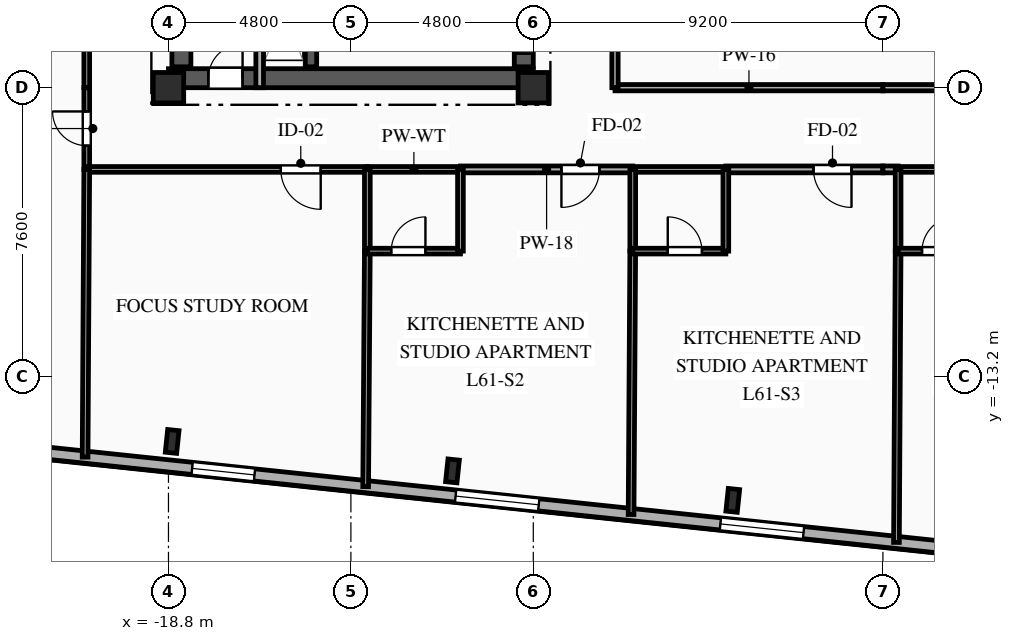
"""IFC4 building model, lengths in metres.
Left out: names, types, materials, properties, quantities, classifications, styles, units other than length and angle.
Written with IfcOpenShell. Run it as: python <this file> out.ifc"""

import sys

from ifc_helpers import new_model, si_unit, direction, frame, frame_2d, origin, origin_2d, place, context, subcontext, project, spatial, rectangle, i_section, extrude, element, fill, save


model = new_model("IFC4")
c1 = context("Model", 3, precision=1e-05, world=origin(), true_north=direction((0.0, 1.0)))
c2 = subcontext(c1, "Body", "Model", "MODEL_VIEW")
j1 = project(units=[si_unit("LENGTHUNIT", "METRE"), si_unit("PLANEANGLEUNIT", "RADIAN")], contexts=[c1])
p1 = place(None, origin())
s1 = spatial("IfcSite", under=j1, at=p1, CompositionType="ELEMENT")
p2 = place(p1, origin())
s2 = spatial("IfcBuilding", under=s1, at=p2, CompositionType="ELEMENT")
p3 = place(p2, frame((0.0, 0.0, 216.5)))
s3 = spatial("IfcBuildingStorey", under=s2, at=p3, CompositionType="ELEMENT", Elevation=216.5)
for number, where, z_axis, x_axis in (
    (1, (-18.8, -5.6, 0.0), (0.0, 0.0, 1.0), (1.0, 0.0, 0.0)),
    (2, (-9.2, -5.6, 0.0), (0.0, 0.0, 1.0), (1.0, 0.0, 0.0)),
):
    element("IfcColumn", number, at=place(p3, frame(where, z_axis=z_axis, x_axis=x_axis)), inside=s3, PredefinedType="COLUMN", context=c2, shape_type="SweptSolid", body=[
        extrude(rectangle(XDim=0.8, YDim=0.8, at=origin_2d()), origin(), (0.0, 0.0, 1.0), 3.35),
    ])
for number, where, z_axis, x_axis in (
    (3, (-18.703, -14.908, 0.0), (0.0, 0.0, 1.0), (0.995, -0.105, 0.0)),
    (4, (-11.327, -15.683, 0.0), (0.0, 0.0, 1.0), (0.995, -0.105, 0.0)),
    (5, (-3.951, -16.458, 0.0), (0.0, 0.0, 1.0), (0.995, -0.105, 0.0)),
):
    element("IfcColumn", number, at=place(p3, frame(where, z_axis=z_axis, x_axis=x_axis)), inside=s3, PredefinedType="COLUMN", context=c2, shape_type="SweptSolid", body=[
        extrude(i_section(OverallWidth=0.3, OverallDepth=0.6, WebThickness=0.015, FlangeThickness=0.03, FilletRadius=0.027, at=origin_2d()), origin(), (0.0, 0.0, 1.0), 3.35),
    ])
p4 = place(p3, frame((18.756, -19.498, 0.0), z_axis=(0.0, 0.0, 1.0), x_axis=(-0.994522060044, 0.104526896475, 0.0)))
e6 = element("IfcWall", 6, at=p4, inside=s3, PredefinedType="SOLIDWALL", context=c2, shape_type="SweptSolid", body=[
    extrude(rectangle(XDim=45.8, YDim=0.32, at=frame_2d((22.9, 0.0))), origin(), (0.0, 0.0, 1.0), 3.04),
])
p5 = place(p4, frame((1.657, 0.0, 0.85)))
e7 = element("IfcOpeningElement", 7, at=p5, cuts=e6, PredefinedType="OPENING", context=c2, shape_type="SweptSolid", body=[
    extrude(rectangle(XDim=1.65, YDim=1.85, at=frame_2d((0.825, 0.925))), frame((0.0, 0.17, 0.0), z_axis=(0.0, -1.0, 0.0), x_axis=(1.0, 0.0, 0.0)), (0.0, 0.0, 1.0), 0.34),
])
p6 = place(p4, frame((6.907, 0.0, 0.85)))
e8 = element("IfcOpeningElement", 8, at=p6, cuts=e6, PredefinedType="OPENING", context=c2, shape_type="SweptSolid", body=[
    extrude(rectangle(XDim=2.2, YDim=1.85, at=frame_2d((1.1, 0.925))), frame((0.0, 0.17, 0.0), z_axis=(0.0, -1.0, 0.0), x_axis=(1.0, 0.0, 0.0)), (0.0, 0.0, 1.0), 0.34),
])
p7 = place(p4, frame((13.953, 0.0, 0.85)))
e9 = element("IfcOpeningElement", 9, at=p7, cuts=e6, PredefinedType="OPENING", context=c2, shape_type="SweptSolid", body=[
    extrude(rectangle(XDim=2.2, YDim=1.85, at=frame_2d((1.1, 0.925))), frame((0.0, 0.17, 0.0), z_axis=(0.0, -1.0, 0.0), x_axis=(1.0, 0.0, 0.0)), (0.0, 0.0, 1.0), 0.34),
])
p8 = place(p4, frame((20.959, 0.0, 0.85)))
e10 = element("IfcOpeningElement", 10, at=p8, cuts=e6, PredefinedType="OPENING", context=c2, shape_type="SweptSolid", body=[
    extrude(rectangle(XDim=2.2, YDim=1.85, at=frame_2d((1.1, 0.925))), frame((0.0, 0.17, 0.0), z_axis=(0.0, -1.0, 0.0), x_axis=(1.0, 0.0, 0.0)), (0.0, 0.0, 1.0), 0.34),
])
p9 = place(p4, frame((27.965, 0.0, 0.85)))
e11 = element("IfcOpeningElement", 11, at=p9, cuts=e6, PredefinedType="OPENING", context=c2, shape_type="SweptSolid", body=[
    extrude(rectangle(XDim=2.2, YDim=1.85, at=frame_2d((1.1, 0.925))), frame((0.0, 0.17, 0.0), z_axis=(0.0, -1.0, 0.0), x_axis=(1.0, 0.0, 0.0)), (0.0, 0.0, 1.0), 0.34),
])
p10 = place(p4, frame((35.487, 0.0, 0.85)))
e12 = element("IfcOpeningElement", 12, at=p10, cuts=e6, PredefinedType="OPENING", context=c2, shape_type="SweptSolid", body=[
    extrude(rectangle(XDim=1.65, YDim=1.85, at=frame_2d((0.825, 0.925))), frame((0.0, 0.17, 0.0), z_axis=(0.0, -1.0, 0.0), x_axis=(1.0, 0.0, 0.0)), (0.0, 0.0, 1.0), 0.34),
])
p11 = place(p4, frame((41.212, 0.0, 0.85)))
e13 = element("IfcOpeningElement", 13, at=p11, cuts=e6, PredefinedType="OPENING", context=c2, shape_type="SweptSolid", body=[
    extrude(rectangle(XDim=1.65, YDim=1.85, at=frame_2d((0.825, 0.925))), frame((0.0, 0.17, 0.0), z_axis=(0.0, -1.0, 0.0), x_axis=(1.0, 0.0, 0.0)), (0.0, 0.0, 1.0), 0.34),
])
p12 = place(p3, frame((-18.8, -5.35, 0.0), z_axis=(0.0, 0.0, 1.0), x_axis=(1.0, 0.0, 0.0)))
e14 = element("IfcWall", 14, at=p12, inside=s3, PredefinedType="SHEAR", context=c2, shape_type="SweptSolid", body=[
    extrude(rectangle(XDim=9.6, YDim=0.5, at=frame_2d((4.8, 0.0))), origin(), (0.0, 0.0, 1.0), 3.04),
])
p13 = place(p12, frame((1.05, 0.0, 0.0)))
e15 = element("IfcOpeningElement", 15, at=p13, cuts=e14, PredefinedType="OPENING", context=c2, shape_type="SweptSolid", body=[
    extrude(rectangle(XDim=0.9, YDim=2.1, at=frame_2d((0.45, 1.05))), frame((0.0, 0.26, 0.0), z_axis=(0.0, -1.0, 0.0), x_axis=(1.0, 0.0, 0.0)), (0.0, 0.0, 1.0), 0.52),
])
p14 = place(p3, frame((-18.46, -5.05, 0.0), z_axis=(0.0, 0.0, 1.0), x_axis=(0.0, 1.0, 0.0)))
e16 = element("IfcWall", 16, at=p14, inside=s3, PredefinedType="SHEAR", context=c2, shape_type="SweptSolid", body=[
    extrude(rectangle(XDim=10.1, YDim=0.5, at=frame_2d((5.05, 0.0))), origin(), (0.0, 0.0, 1.0), 3.04),
])
p15 = place(p3, frame((-9.45, -5.05, 0.0), z_axis=(0.0, 0.0, 1.0), x_axis=(0.0, 1.0, 0.0)))
e17 = element("IfcWall", 17, at=p15, inside=s3, PredefinedType="SHEAR", context=c2, shape_type="SweptSolid", body=[
    extrude(rectangle(XDim=10.1, YDim=0.5, at=frame_2d((5.05, 0.0))), origin(), (0.0, 0.0, 1.0), 3.04),
])
p16 = place(p15, frame((7.15, 0.0, 0.0)))
e18 = element("IfcOpeningElement", 18, at=p16, cuts=e17, PredefinedType="OPENING", context=c2, shape_type="SweptSolid", body=[
    extrude(rectangle(XDim=0.9, YDim=2.1, at=frame_2d((0.45, 1.05))), frame((0.0, 0.26, 0.0), z_axis=(0.0, -1.0, 0.0), x_axis=(1.0, 0.0, 0.0)), (0.0, 0.0, 1.0), 0.52),
])
p17 = place(p15, frame((2.4, 0.0, 0.0)))
e19 = element("IfcOpeningElement", 19, at=p17, cuts=e17, PredefinedType="OPENING", context=c2, shape_type="SweptSolid", body=[
    extrude(rectangle(XDim=1.2, YDim=2.15, at=frame_2d((0.6, 1.075))), frame((0.0, 0.26, 0.0), z_axis=(0.0, -1.0, 0.0), x_axis=(1.0, 0.0, 0.0)), (0.0, 0.0, 1.0), 0.52),
])
p18 = place(p15, frame((0.35, 0.0, 0.0)))
e20 = element("IfcOpeningElement", 20, at=p18, cuts=e17, PredefinedType="OPENING", context=c2, shape_type="SweptSolid", body=[
    extrude(rectangle(XDim=0.9, YDim=2.1, at=frame_2d((0.45, 1.05))), frame((0.0, 0.26, 0.0), z_axis=(0.0, -1.0, 0.0), x_axis=(1.0, 0.0, 0.0)), (0.0, 0.0, 1.0), 0.52),
])
p19 = place(p15, frame((5.0, 0.0, 0.0)))
e21 = element("IfcOpeningElement", 21, at=p19, cuts=e17, PredefinedType="OPENING", context=c2, shape_type="SweptSolid", body=[
    extrude(rectangle(XDim=0.9, YDim=2.1, at=frame_2d((0.45, 1.05))), frame((0.0, 0.26, 0.0), z_axis=(0.0, -1.0, 0.0), x_axis=(1.0, 0.0, 0.0)), (0.0, 0.0, 1.0), 0.52),
])
p20 = place(p3, frame((-15.05, -5.05, 0.0), z_axis=(0.0, 0.0, 1.0), x_axis=(0.0, 1.0, 0.0)))
e22 = element("IfcWall", 22, at=p20, inside=s3, PredefinedType="SHEAR", context=c2, shape_type="SweptSolid", body=[
    extrude(rectangle(XDim=10.1, YDim=0.3, at=frame_2d((5.05, 0.0))), origin(), (0.0, 0.0, 1.0), 3.04),
])
p21 = place(p3, frame((-16.4, -5.6, 0.0), z_axis=(0.0, 0.0, 1.0), x_axis=(0.0, 1.0, 0.0)))
e23 = element("IfcWall", 23, at=p21, inside=s3, PredefinedType="PARTITIONING", context=c2, shape_type="SweptSolid", body=[
    extrude(rectangle(XDim=3.49, YDim=0.2, at=frame_2d((1.745, 0.0))), origin(), (0.0, 0.0, 1.0), 3.04),
])
p22 = place(p3, frame((-20.95, -7.75, 0.0), z_axis=(0.0, 0.0, 1.0), x_axis=(0.0, 1.0, 0.0)))
e24 = element("IfcWall", 24, at=p22, inside=s3, PredefinedType="PARTITIONING", context=c2, shape_type="SweptSolid", body=[
    extrude(rectangle(XDim=2.15, YDim=0.15, at=frame_2d((1.075, 0.0))), origin(), (0.0, 0.0, 1.0), 3.04),
])
p23 = place(p22, frame((0.625, 0.0, 0.0)))
e25 = element("IfcOpeningElement", 25, at=p23, cuts=e24, PredefinedType="OPENING", context=c2, shape_type="SweptSolid", body=[
    extrude(rectangle(XDim=0.9, YDim=2.1, at=frame_2d((0.45, 1.05))), frame((0.0, 0.085, 0.0), z_axis=(0.0, -1.0, 0.0), x_axis=(1.0, 0.0, 0.0)), (0.0, 0.0, 1.0), 0.17),
])
p24 = place(p3, frame((-13.567, -7.75, 0.0), z_axis=(0.0, 0.0, 1.0), x_axis=(-1.0, 0.0, 0.0)))
e26 = element("IfcWall", 26, at=p24, inside=s3, PredefinedType="PARTITIONING", context=c2, shape_type="SweptSolid", body=[
    extrude(rectangle(XDim=7.383, YDim=0.15, at=frame_2d((3.691, 0.0))), origin(), (0.0, 0.0, 1.0), 3.04),
])
p25 = place(p24, frame((1.227, 0.0, 0.0)))
e27 = element("IfcOpeningElement", 27, at=p25, cuts=e26, PredefinedType="OPENING", context=c2, shape_type="SweptSolid", body=[
    extrude(rectangle(XDim=1.05, YDim=2.15, at=frame_2d((0.525, 1.075))), frame((0.0, 0.085, 0.0), z_axis=(0.0, -1.0, 0.0), x_axis=(1.0, 0.0, 0.0)), (0.0, 0.0, 1.0), 0.17),
])
p26 = place(p3, frame((-6.583, -7.75, 0.0), z_axis=(0.0, 0.0, 1.0), x_axis=(-1.0, 0.0, 0.0)))
e28 = element("IfcWall", 28, at=p26, inside=s3, PredefinedType="PARTITIONING", context=c2, shape_type="SweptSolid", body=[
    extrude(rectangle(XDim=4.534, YDim=0.18, at=frame_2d((2.267, 0.0))), origin(), (0.0, 0.0, 1.0), 3.04),
])
p27 = place(p26, frame((0.877, 0.0, 0.0)))
e29 = element("IfcOpeningElement", 29, at=p27, cuts=e28, PredefinedType="OPENING", context=c2, shape_type="SweptSolid", body=[
    extrude(rectangle(XDim=1.0, YDim=2.15, at=frame_2d((0.5, 1.075))), frame((0.0, 0.1, 0.0), z_axis=(0.0, -1.0, 0.0), x_axis=(1.0, 0.0, 0.0)), (0.0, 0.0, 1.0), 0.2),
])
p28 = place(p3, frame((-11.117, -7.75, 0.0), z_axis=(0.0, 0.0, 1.0), x_axis=(-1.0, 0.0, 0.0)))
e30 = element("IfcWall", 30, at=p28, inside=s3, PredefinedType="PLUMBINGWALL", context=c2, shape_type="SweptSolid", body=[
    extrude(rectangle(XDim=2.45, YDim=0.15, at=frame_2d((1.225, 0.0))), origin(), (0.0, 0.0, 1.0), 3.04),
])
p29 = place(p3, frame((0.0, -7.75, 0.0), z_axis=(0.0, 0.0, 1.0), x_axis=(-1.0, 0.0, 0.0)))
e31 = element("IfcWall", 31, at=p29, inside=s3, PredefinedType="PARTITIONING", context=c2, shape_type="SweptSolid", body=[
    extrude(rectangle(XDim=4.133, YDim=0.18, at=frame_2d((2.066, 0.0))), origin(), (0.0, 0.0, 1.0), 3.04),
])
p30 = place(p29, frame((0.827, 0.0, 0.0)))
e32 = element("IfcOpeningElement", 32, at=p30, cuts=e31, PredefinedType="OPENING", context=c2, shape_type="SweptSolid", body=[
    extrude(rectangle(XDim=1.0, YDim=2.15, at=frame_2d((0.5, 1.075))), frame((0.0, 0.1, 0.0), z_axis=(0.0, -1.0, 0.0), x_axis=(1.0, 0.0, 0.0)), (0.0, 0.0, 1.0), 0.2),
])
p31 = place(p3, frame((-4.133, -7.75, 0.0), z_axis=(0.0, 0.0, 1.0), x_axis=(-1.0, 0.0, 0.0)))
e33 = element("IfcWall", 33, at=p31, inside=s3, PredefinedType="PLUMBINGWALL", context=c2, shape_type="SweptSolid", body=[
    extrude(rectangle(XDim=2.45, YDim=0.15, at=frame_2d((1.225, 0.0))), origin(), (0.0, 0.0, 1.0), 3.04),
])
p32 = place(p3, frame((-7.05, -5.6, 0.0), z_axis=(0.0, 0.0, 1.0), x_axis=(1.0, 0.0, 0.0)))
e34 = element("IfcWall", 34, at=p32, inside=s3, PredefinedType="PARTITIONING", context=c2, shape_type="SweptSolid", body=[
    extrude(rectangle(XDim=7.05, YDim=0.165, at=frame_2d((3.525, 0.0))), origin(), (0.0, 0.0, 1.0), 2.525),
])
p33 = place(p3, frame((0.4, -7.75, 0.0), z_axis=(0.0, 0.0, 1.0), x_axis=(-1.0, 0.0, 0.0)))
e35 = element("IfcWall", 35, at=p33, inside=s3, PredefinedType="PARTITIONING", context=c2, shape_type="SweptSolid", body=[
    extrude(rectangle(XDim=0.4, YDim=0.18, at=frame_2d((0.2, 0.0))), origin(), (0.0, 0.0, 1.0), 3.04),
])
p34 = place(p3, frame((2.85, -7.75, 0.0), z_axis=(0.0, 0.0, 1.0), x_axis=(-1.0, 0.0, 0.0)))
e36 = element("IfcWall", 36, at=p34, inside=s3, PredefinedType="PLUMBINGWALL", context=c2, shape_type="SweptSolid", body=[
    extrude(rectangle(XDim=2.45, YDim=0.15, at=frame_2d((1.225, 0.0))), origin(), (0.0, 0.0, 1.0), 3.04),
])
p35 = place(p3, frame((0.0, -5.6, 0.0), z_axis=(0.0, 0.0, 1.0), x_axis=(1.0, 0.0, 0.0)))
e37 = element("IfcWall", 37, at=p35, inside=s3, PredefinedType="PARTITIONING", context=c2, shape_type="SweptSolid", body=[
    extrude(rectangle(XDim=7.05, YDim=0.165, at=frame_2d((3.525, 0.0))), origin(), (0.0, 0.0, 1.0), 2.525),
])
p36 = place(p3, frame((-20.95, -5.6, 0.0), z_axis=(0.0, 0.0, 1.0), x_axis=(0.0, 1.0, 0.0)))
e38 = element("IfcWall", 38, at=p36, inside=s3, PredefinedType="PARTITIONING", context=c2, shape_type="SweptSolid", body=[
    extrude(rectangle(XDim=2.144, YDim=0.15, at=frame_2d((1.072, 0.0))), origin(), (0.0, 0.0, 1.0), 3.04),
])
p37 = place(p3, frame((-7.05, -2.95, 0.0), z_axis=(0.0, 0.0, 1.0), x_axis=(0.0, -1.0, 0.0)))
e39 = element("IfcWall", 39, at=p37, inside=s3, PredefinedType="PARTITIONING", context=c2, shape_type="SweptSolid", body=[
    extrude(rectangle(XDim=2.65, YDim=0.165, at=frame_2d((1.325, 0.0))), origin(), (0.0, 0.0, 1.0), 3.04),
])
p38 = place(p3, frame((-20.95, -7.75, 0.0), z_axis=(0.0, 0.0, 1.0), x_axis=(-0.005804668564, -0.99998315277, 0.0)))
e40 = element("IfcWall", 40, at=p38, inside=s3, PredefinedType="PARTITIONING", context=c2, shape_type="SweptSolid", body=[
    extrude(rectangle(XDim=7.571, YDim=0.15, at=frame_2d((3.785, 0.0))), origin(), (0.0, 0.0, 1.0), 3.04),
])
p39 = place(p3, frame((-13.567, -9.9, 0.0), z_axis=(0.0, 0.0, 1.0), x_axis=(-0.007091740814, -0.99997485329, 0.0)))
e41 = element("IfcWall", 41, at=p39, inside=s3, PredefinedType="PARTITIONING", context=c2, shape_type="SweptSolid", body=[
    extrude(rectangle(XDim=6.197, YDim=0.15, at=frame_2d((3.098, 0.0))), origin(), (0.0, 0.0, 1.0), 3.04),
])
p40 = place(p3, frame((-13.567, -7.75, 0.0), z_axis=(0.0, 0.0, 1.0), x_axis=(0.0, -1.0, 0.0)))
e42 = element("IfcWall", 42, at=p40, inside=s3, PredefinedType="PLUMBINGWALL", context=c2, shape_type="SweptSolid", body=[
    extrude(rectangle(XDim=2.15, YDim=0.15, at=frame_2d((1.075, 0.0))), origin(), (0.0, 0.0, 1.0), 3.04),
])
p41 = place(p3, frame((-13.567, -9.9, 0.0), z_axis=(0.0, 0.0, 1.0), x_axis=(1.0, 0.0, 0.0)))
e43 = element("IfcWall", 43, at=p41, inside=s3, PredefinedType="PLUMBINGWALL", context=c2, shape_type="SweptSolid", body=[
    extrude(rectangle(XDim=2.45, YDim=0.15, at=frame_2d((1.225, 0.0))), origin(), (0.0, 0.0, 1.0), 3.04),
])
p42 = place(p41, frame((0.629, 0.0, 0.0)))
e44 = element("IfcOpeningElement", 44, at=p42, cuts=e43, PredefinedType="OPENING", context=c2, shape_type="SweptSolid", body=[
    extrude(rectangle(XDim=0.9, YDim=2.1, at=frame_2d((0.45, 1.05))), frame((0.0, 0.085, 0.0), z_axis=(0.0, -1.0, 0.0), x_axis=(1.0, 0.0, 0.0)), (0.0, 0.0, 1.0), 0.17),
])
p43 = place(p3, frame((-11.117, -9.9, 0.0), z_axis=(0.0, 0.0, 1.0), x_axis=(0.0, 1.0, 0.0)))
e45 = element("IfcWall", 45, at=p43, inside=s3, PredefinedType="PLUMBINGWALL", context=c2, shape_type="SweptSolid", body=[
    extrude(rectangle(XDim=2.15, YDim=0.15, at=frame_2d((1.075, 0.0))), origin(), (0.0, 0.0, 1.0), 3.04),
])
p44 = place(p3, frame((-6.583, -9.9, 0.0), z_axis=(0.0, 0.0, 1.0), x_axis=(-0.006340579882, -0.999979898321, 0.0)))
e46 = element("IfcWall", 46, at=p44, inside=s3, PredefinedType="PARTITIONING", context=c2, shape_type="SweptSolid", body=[
    extrude(rectangle(XDim=6.931, YDim=0.15, at=frame_2d((3.465, 0.0))), origin(), (0.0, 0.0, 1.0), 3.04),
])
p45 = place(p3, frame((-6.583, -7.75, 0.0), z_axis=(0.0, 0.0, 1.0), x_axis=(0.0, -1.0, 0.0)))
e47 = element("IfcWall", 47, at=p45, inside=s3, PredefinedType="PLUMBINGWALL", context=c2, shape_type="SweptSolid", body=[
    extrude(rectangle(XDim=2.15, YDim=0.15, at=frame_2d((1.075, 0.0))), origin(), (0.0, 0.0, 1.0), 3.04),
])
p46 = place(p3, frame((-6.583, -9.9, 0.0), z_axis=(0.0, 0.0, 1.0), x_axis=(1.0, 0.0, 0.0)))
e48 = element("IfcWall", 48, at=p46, inside=s3, PredefinedType="PLUMBINGWALL", context=c2, shape_type="SweptSolid", body=[
    extrude(rectangle(XDim=2.45, YDim=0.15, at=frame_2d((1.225, 0.0))), origin(), (0.0, 0.0, 1.0), 3.04),
])
p47 = place(p46, frame((0.921, 0.0, 0.0)))
e49 = element("IfcOpeningElement", 49, at=p47, cuts=e48, PredefinedType="OPENING", context=c2, shape_type="SweptSolid", body=[
    extrude(rectangle(XDim=0.9, YDim=2.1, at=frame_2d((0.45, 1.05))), frame((0.0, 0.085, 0.0), z_axis=(0.0, -1.0, 0.0), x_axis=(1.0, 0.0, 0.0)), (0.0, 0.0, 1.0), 0.17),
])
p48 = place(p3, frame((-4.133, -9.9, 0.0), z_axis=(0.0, 0.0, 1.0), x_axis=(0.0, 1.0, 0.0)))
e50 = element("IfcWall", 50, at=p48, inside=s3, PredefinedType="PLUMBINGWALL", context=c2, shape_type="SweptSolid", body=[
    extrude(rectangle(XDim=2.15, YDim=0.15, at=frame_2d((1.075, 0.0))), origin(), (0.0, 0.0, 1.0), 3.04),
])
p49 = place(p3, frame((0.4, -9.9, 0.0), z_axis=(0.0, 0.0, 1.0), x_axis=(-0.005701633766, -0.999983745554, 0.0)))
e51 = element("IfcWall", 51, at=p49, inside=s3, PredefinedType="PARTITIONING", context=c2, shape_type="SweptSolid", body=[
    extrude(rectangle(XDim=7.665, YDim=0.15, at=frame_2d((3.833, 0.0))), origin(), (0.0, 0.0, 1.0), 3.04),
])
p50 = place(p3, frame((0.4, -7.75, 0.0), z_axis=(0.0, 0.0, 1.0), x_axis=(0.0, -1.0, 0.0)))
e52 = element("IfcWall", 52, at=p50, inside=s3, PredefinedType="PLUMBINGWALL", context=c2, shape_type="SweptSolid", body=[
    extrude(rectangle(XDim=2.15, YDim=0.15, at=frame_2d((1.075, 0.0))), origin(), (0.0, 0.0, 1.0), 3.04),
])
p51 = place(p3, frame((0.4, -9.9, 0.0), z_axis=(0.0, 0.0, 1.0), x_axis=(1.0, 0.0, 0.0)))
e53 = element("IfcWall", 53, at=p51, inside=s3, PredefinedType="PLUMBINGWALL", context=c2, shape_type="SweptSolid", body=[
    extrude(rectangle(XDim=2.45, YDim=0.15, at=frame_2d((1.225, 0.0))), origin(), (0.0, 0.0, 1.0), 3.04),
])
p52 = place(p51, frame((0.629, 0.0, 0.0)))
e54 = element("IfcOpeningElement", 54, at=p52, cuts=e53, PredefinedType="OPENING", context=c2, shape_type="SweptSolid", body=[
    extrude(rectangle(XDim=0.9, YDim=2.1, at=frame_2d((0.45, 1.05))), frame((0.0, 0.085, 0.0), z_axis=(0.0, -1.0, 0.0), x_axis=(1.0, 0.0, 0.0)), (0.0, 0.0, 1.0), 0.17),
])
p53 = place(p8, origin())
e55 = element("IfcWindow", 55, at=p53, inside=s3, PartitioningType="SINGLE_PANEL", PredefinedType="WINDOW", context=c2, shape_type="SweptSolid", body=[
    extrude(rectangle(XDim=2.2, YDim=1.85, at=frame_2d((1.1, 0.925))), frame((0.0, 0.03, 0.0), z_axis=(0.0, -1.0, 0.0), x_axis=(1.0, 0.0, 0.0)), (0.0, 0.0, 1.0), 0.06),
])
fill(e10, e55)
p54 = place(p9, origin())
e56 = element("IfcWindow", 56, at=p54, inside=s3, PartitioningType="SINGLE_PANEL", PredefinedType="WINDOW", context=c2, shape_type="SweptSolid", body=[
    extrude(rectangle(XDim=2.2, YDim=1.85, at=frame_2d((1.1, 0.925))), frame((0.0, 0.03, 0.0), z_axis=(0.0, -1.0, 0.0), x_axis=(1.0, 0.0, 0.0)), (0.0, 0.0, 1.0), 0.06),
])
fill(e11, e56)
p55 = place(p10, origin())
e57 = element("IfcWindow", 57, at=p55, inside=s3, PartitioningType="SINGLE_PANEL", PredefinedType="WINDOW", context=c2, shape_type="SweptSolid", body=[
    extrude(rectangle(XDim=1.65, YDim=1.85, at=frame_2d((0.825, 0.925))), frame((0.0, 0.03, 0.0), z_axis=(0.0, -1.0, 0.0), x_axis=(1.0, 0.0, 0.0)), (0.0, 0.0, 1.0), 0.06),
])
fill(e12, e57)
p56 = place(p13, origin())
e58 = element("IfcDoor", 58, at=p56, inside=s3, OperationType="SINGLE_SWING_RIGHT", PredefinedType="DOOR", context=c2, shape_type="SweptSolid", body=[
    extrude(rectangle(XDim=0.9, YDim=2.1, at=frame_2d((0.45, 1.05))), frame((0.0, 0.025, 0.0), z_axis=(0.0, -1.0, 0.0), x_axis=(1.0, 0.0, 0.0)), (0.0, 0.0, 1.0), 0.05),
])
fill(e15, e58)
p57 = place(p18, origin())
e59 = element("IfcDoor", 59, at=p57, inside=s3, OperationType="SINGLE_SWING_RIGHT", PredefinedType="DOOR", context=c2, shape_type="SweptSolid", body=[
    extrude(rectangle(XDim=0.9, YDim=2.1, at=frame_2d((0.45, 1.05))), frame((0.0, 0.025, 0.0), z_axis=(0.0, -1.0, 0.0), x_axis=(1.0, 0.0, 0.0)), (0.0, 0.0, 1.0), 0.05),
])
fill(e20, e59)
p58 = place(p23, origin())
e60 = element("IfcDoor", 60, at=p58, inside=s3, OperationType="SINGLE_SWING_RIGHT", PredefinedType="DOOR", context=c2, shape_type="SweptSolid", body=[
    extrude(rectangle(XDim=0.9, YDim=2.1, at=frame_2d((0.45, 1.05))), frame((0.0, 0.025, 0.0), z_axis=(0.0, -1.0, 0.0), x_axis=(1.0, 0.0, 0.0)), (0.0, 0.0, 1.0), 0.05),
])
fill(e25, e60)
p59 = place(p25, origin())
e61 = element("IfcDoor", 61, at=p59, inside=s3, OperationType="SINGLE_SWING_LEFT", PredefinedType="DOOR", context=c2, shape_type="SweptSolid", body=[
    extrude(rectangle(XDim=1.05, YDim=2.15, at=frame_2d((0.525, 1.075))), frame((0.0, 0.025, 0.0), z_axis=(0.0, -1.0, 0.0), x_axis=(1.0, 0.0, 0.0)), (0.0, 0.0, 1.0), 0.05),
])
fill(e27, e61)
p60 = place(p27, origin())
e62 = element("IfcDoor", 62, at=p60, inside=s3, OperationType="SINGLE_SWING_RIGHT", PredefinedType="DOOR", context=c2, shape_type="SweptSolid", body=[
    extrude(rectangle(XDim=1.0, YDim=2.15, at=frame_2d((0.5, 1.075))), frame((0.0, 0.025, 0.0), z_axis=(0.0, -1.0, 0.0), x_axis=(1.0, 0.0, 0.0)), (0.0, 0.0, 1.0), 0.05),
])
fill(e29, e62)
p61 = place(p30, origin())
e63 = element("IfcDoor", 63, at=p61, inside=s3, OperationType="SINGLE_SWING_LEFT", PredefinedType="DOOR", context=c2, shape_type="SweptSolid", body=[
    extrude(rectangle(XDim=1.0, YDim=2.15, at=frame_2d((0.5, 1.075))), frame((0.0, 0.025, 0.0), z_axis=(0.0, -1.0, 0.0), x_axis=(1.0, 0.0, 0.0)), (0.0, 0.0, 1.0), 0.05),
])
fill(e32, e63)
p62 = place(p42, origin())
e64 = element("IfcDoor", 64, at=p62, inside=s3, OperationType="SINGLE_SWING_RIGHT", PredefinedType="DOOR", context=c2, shape_type="SweptSolid", body=[
    extrude(rectangle(XDim=0.9, YDim=2.1, at=frame_2d((0.45, 1.05))), frame((0.0, 0.025, 0.0), z_axis=(0.0, -1.0, 0.0), x_axis=(1.0, 0.0, 0.0)), (0.0, 0.0, 1.0), 0.05),
])
fill(e44, e64)
p63 = place(p47, origin())
e65 = element("IfcDoor", 65, at=p63, inside=s3, OperationType="SINGLE_SWING_LEFT", PredefinedType="DOOR", context=c2, shape_type="SweptSolid", body=[
    extrude(rectangle(XDim=0.9, YDim=2.1, at=frame_2d((0.45, 1.05))), frame((0.0, 0.025, 0.0), z_axis=(0.0, -1.0, 0.0), x_axis=(1.0, 0.0, 0.0)), (0.0, 0.0, 1.0), 0.05),
])
fill(e49, e65)
p64 = place(p52, origin())
e66 = element("IfcDoor", 66, at=p64, inside=s3, OperationType="SINGLE_SWING_RIGHT", PredefinedType="DOOR", context=c2, shape_type="SweptSolid", body=[
    extrude(rectangle(XDim=0.9, YDim=2.1, at=frame_2d((0.45, 1.05))), frame((0.0, 0.025, 0.0), z_axis=(0.0, -1.0, 0.0), x_axis=(1.0, 0.0, 0.0)), (0.0, 0.0, 1.0), 0.05),
])
fill(e54, e66)
save(model, sys.argv[1])
